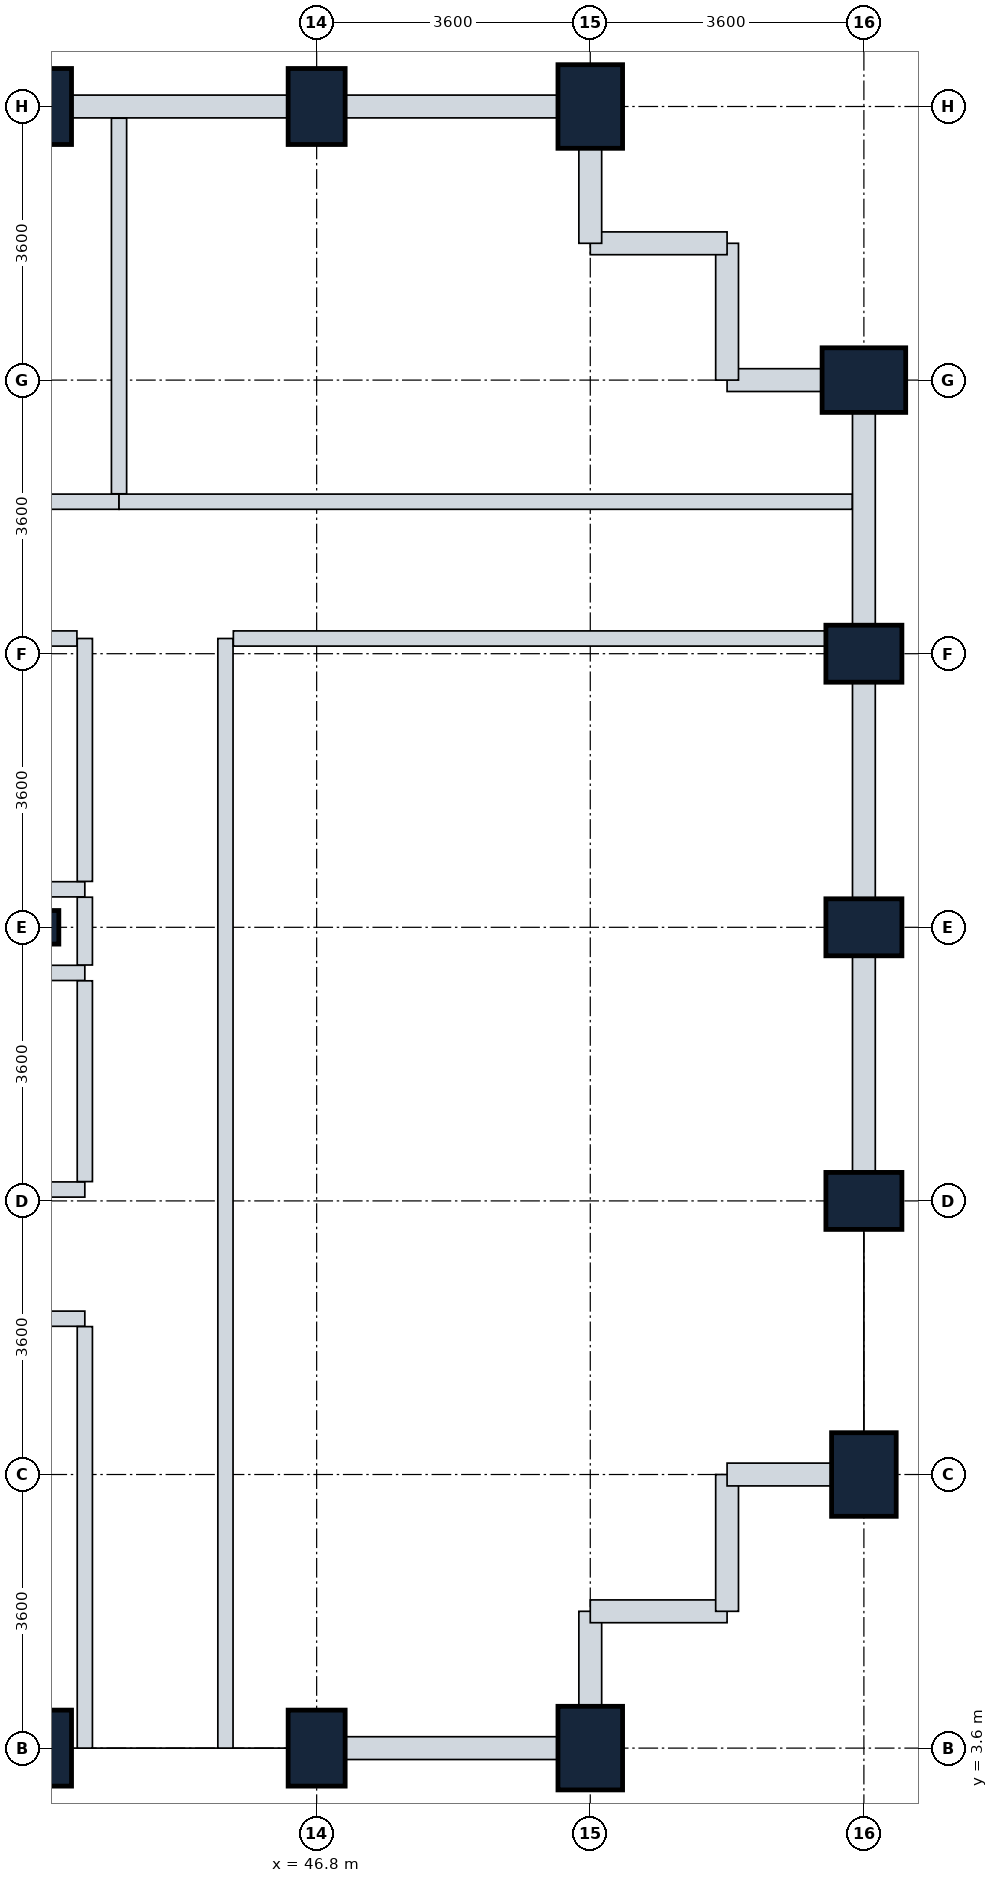
"""IFC4 building model, lengths in metres.
Left out: names, types, materials, properties, quantities, classifications, styles, units other than length and angle.
Written with IfcOpenShell. Run it as: python <this file> out.ifc"""

import sys

from ifc_helpers import new_model, si_unit, direction, frame, frame_2d, origin, origin_2d, place, context, subcontext, project, spatial, rectangle, i_section, extrude, element, fill, save


model = new_model("IFC4")
c1 = context("Model", 3, precision=1e-05, world=origin(), true_north=direction((0.0, 1.0)))
c2 = subcontext(c1, "Body", "Model", "MODEL_VIEW")
j1 = project(units=[si_unit("LENGTHUNIT", "METRE"), si_unit("PLANEANGLEUNIT", "RADIAN")], contexts=[c1])
p1 = place(None, origin())
s1 = spatial("IfcSite", under=j1, at=p1, CompositionType="ELEMENT")
p2 = place(p1, origin())
s2 = spatial("IfcBuilding", under=s1, at=p2, CompositionType="ELEMENT")
p3 = place(p2, frame((0.0, 0.0, 169.4)))
s3 = spatial("IfcBuildingStorey", under=s2, at=p3, CompositionType="ELEMENT", Elevation=169.4)
p4 = place(p3, frame((43.2, 3.6, 0.0), z_axis=(0.0, 0.0, 1.0), x_axis=(1.0, 0.0, 0.0)))
e1 = element("IfcColumn", 1, at=p4, inside=s3, PredefinedType="COLUMN", context=c2, shape_type="SweptSolid", body=[
    extrude(rectangle(XDim=0.75, YDim=1.0, at=origin_2d()), origin(), (0.0, 0.0, 1.0), 5.4),
])
p5 = place(p3, frame((43.2, 14.4, 0.0), z_axis=(0.0, 0.0, 1.0), x_axis=(1.0, 0.0, 0.0)))
e2 = element("IfcColumn", 2, at=p5, inside=s3, PredefinedType="COLUMN", context=c2, shape_type="SweptSolid", body=[
    extrude(i_section(OverallWidth=0.416, OverallDepth=0.442, WebThickness=0.025, FlangeThickness=0.041, FilletRadius=0.015, at=origin_2d()), origin(), (0.0, 0.0, 1.0), 5.4),
])
for number, where, z_axis, x_axis in (
    (3, (43.2, 25.2, 0.0), (0.0, 0.0, 1.0), (1.0, 0.0, 0.0)),
    (4, (46.8, 3.6, 0.0), (0.0, 0.0, 1.0), (1.0, 0.0, 0.0)),
    (5, (46.8, 25.2, 0.0), (0.0, 0.0, 1.0), (1.0, 0.0, 0.0)),
):
    element("IfcColumn", number, at=place(p3, frame(where, z_axis=z_axis, x_axis=x_axis)), inside=s3, PredefinedType="COLUMN", context=c2, shape_type="SweptSolid", body=[
        extrude(rectangle(XDim=0.75, YDim=1.0, at=origin_2d()), origin(), (0.0, 0.0, 1.0), 5.4),
    ])
for number, where, z_axis, x_axis in (
    (6, (50.4, 3.6, 0.0), (0.0, 0.0, 1.0), (1.0, 0.0, 0.0)),
    (7, (50.4, 25.2, 0.0), (0.0, 0.0, 1.0), (1.0, 0.0, 0.0)),
    (8, (54.0, 7.2, 0.0), (0.0, 0.0, 1.0), (1.0, 0.0, 0.0)),
):
    element("IfcColumn", number, at=place(p3, frame(where, z_axis=z_axis, x_axis=x_axis)), inside=s3, PredefinedType="COLUMN", context=c2, shape_type="SweptSolid", body=[
        extrude(rectangle(XDim=0.85, YDim=1.1, at=origin_2d()), origin(), (0.0, 0.0, 1.0), 5.4),
    ])
for number, where, z_axis, x_axis in (
    (9, (54.0, 10.8, 0.0), (0.0, 0.0, 1.0), (0.0, 1.0, 0.0)),
    (10, (54.0, 14.4, 0.0), (0.0, 0.0, 1.0), (0.0, 1.0, 0.0)),
    (11, (54.0, 18.0, 0.0), (0.0, 0.0, 1.0), (0.0, 1.0, 0.0)),
):
    element("IfcColumn", number, at=place(p3, frame(where, z_axis=z_axis, x_axis=x_axis)), inside=s3, PredefinedType="COLUMN", context=c2, shape_type="SweptSolid", body=[
        extrude(rectangle(XDim=0.75, YDim=1.0, at=origin_2d()), origin(), (0.0, 0.0, 1.0), 5.4),
    ])
p6 = place(p3, frame((54.0, 21.6, 0.0), z_axis=(0.0, 0.0, 1.0), x_axis=(0.0, 1.0, 0.0)))
e12 = element("IfcColumn", 12, at=p6, inside=s3, PredefinedType="COLUMN", context=c2, shape_type="SweptSolid", body=[
    extrude(rectangle(XDim=0.85, YDim=1.1, at=origin_2d()), origin(), (0.0, 0.0, 1.0), 5.4),
])
p7 = place(p3, frame((50.4, 3.6, 0.0), z_axis=(0.0, 0.0, 1.0), x_axis=(-1.0, 0.0, 0.0)))
e13 = element("IfcWall", 13, at=p7, inside=s3, PredefinedType="STANDARD", context=c2, shape_type="SweptSolid", body=[
    extrude(rectangle(XDim=3.6, YDim=0.3, at=frame_2d((1.8, 0.0))), origin(), (0.0, 0.0, 1.0), 3.58),
])
p8 = place(p3, frame((50.4, 5.4, 0.0), z_axis=(0.0, 0.0, 1.0), x_axis=(0.0, -1.0, 0.0)))
e14 = element("IfcWall", 14, at=p8, inside=s3, PredefinedType="STANDARD", context=c2, shape_type="SweptSolid", body=[
    extrude(rectangle(XDim=1.8, YDim=0.3, at=frame_2d((0.9, 0.0))), origin(), (0.0, 0.0, 1.0), 3.58),
])
p9 = place(p3, frame((52.2, 5.4, 0.0), z_axis=(0.0, 0.0, 1.0), x_axis=(-1.0, 0.0, 0.0)))
e15 = element("IfcWall", 15, at=p9, inside=s3, PredefinedType="STANDARD", context=c2, shape_type="SweptSolid", body=[
    extrude(rectangle(XDim=1.8, YDim=0.3, at=frame_2d((0.9, 0.0))), origin(), (0.0, 0.0, 1.0), 3.58),
])
p10 = place(p3, frame((52.2, 7.2, 0.0), z_axis=(0.0, 0.0, 1.0), x_axis=(0.0, -1.0, 0.0)))
e16 = element("IfcWall", 16, at=p10, inside=s3, PredefinedType="STANDARD", context=c2, shape_type="SweptSolid", body=[
    extrude(rectangle(XDim=1.8, YDim=0.3, at=frame_2d((0.9, 0.0))), origin(), (0.0, 0.0, 1.0), 5.065),
])
p11 = place(p3, frame((54.0, 7.2, 0.0), z_axis=(0.0, 0.0, 1.0), x_axis=(-1.0, 0.0, 0.0)))
e17 = element("IfcWall", 17, at=p11, inside=s3, PredefinedType="STANDARD", context=c2, shape_type="SweptSolid", body=[
    extrude(rectangle(XDim=1.8, YDim=0.3, at=frame_2d((0.9, 0.0))), origin(), (0.0, 0.0, 1.0), 4.03),
])
p12 = place(p3, frame((54.0, 14.4, 0.0), z_axis=(0.0, 0.0, 1.0), x_axis=(0.0, -1.0, 0.0)))
e18 = element("IfcWall", 18, at=p12, inside=s3, PredefinedType="STANDARD", context=c2, shape_type="SweptSolid", body=[
    extrude(rectangle(XDim=3.6, YDim=0.3, at=frame_2d((1.8, 0.0))), origin(), (0.0, 0.0, 1.0), 3.58),
])
p13 = place(p3, frame((54.0, 18.0, 0.0), z_axis=(0.0, 0.0, 1.0), x_axis=(0.0, -1.0, 0.0)))
e19 = element("IfcWall", 19, at=p13, inside=s3, PredefinedType="STANDARD", context=c2, shape_type="SweptSolid", body=[
    extrude(rectangle(XDim=3.6, YDim=0.3, at=frame_2d((1.8, 0.0))), origin(), (0.0, 0.0, 1.0), 3.58),
])
p14 = place(p3, frame((54.0, 21.6, 0.0), z_axis=(0.0, 0.0, 1.0), x_axis=(0.0, -1.0, 0.0)))
e20 = element("IfcWall", 20, at=p14, inside=s3, PredefinedType="STANDARD", context=c2, shape_type="SweptSolid", body=[
    extrude(rectangle(XDim=3.6, YDim=0.3, at=frame_2d((1.8, 0.0))), origin(), (0.0, 0.0, 1.0), 4.03),
])
p15 = place(p3, frame((52.2, 21.6, 0.0), z_axis=(0.0, 0.0, 1.0), x_axis=(1.0, 0.0, 0.0)))
e21 = element("IfcWall", 21, at=p15, inside=s3, PredefinedType="STANDARD", context=c2, shape_type="SweptSolid", body=[
    extrude(rectangle(XDim=1.8, YDim=0.3, at=frame_2d((0.9, 0.0))), origin(), (0.0, 0.0, 1.0), 4.03),
])
p16 = place(p3, frame((52.2, 23.4, 0.0), z_axis=(0.0, 0.0, 1.0), x_axis=(0.0, -1.0, 0.0)))
e22 = element("IfcWall", 22, at=p16, inside=s3, PredefinedType="STANDARD", context=c2, shape_type="SweptSolid", body=[
    extrude(rectangle(XDim=1.8, YDim=0.3, at=frame_2d((0.9, 0.0))), origin(), (0.0, 0.0, 1.0), 5.065),
])
for number, where, z_axis, x_axis in (
    (23, (50.4, 23.4, 0.0), (0.0, 0.0, 1.0), (1.0, 0.0, 0.0)),
    (24, (50.4, 25.2, 0.0), (0.0, 0.0, 1.0), (0.0, -1.0, 0.0)),
):
    element("IfcWall", number, at=place(p3, frame(where, z_axis=z_axis, x_axis=x_axis)), inside=s3, PredefinedType="STANDARD", context=c2, shape_type="SweptSolid", body=[
        extrude(rectangle(XDim=1.8, YDim=0.3, at=frame_2d((0.9, 0.0))), origin(), (0.0, 0.0, 1.0), 3.58),
    ])
p17 = place(p3, frame((46.8, 25.2, 0.0), z_axis=(0.0, 0.0, 1.0), x_axis=(1.0, 0.0, 0.0)))
e25 = element("IfcWall", 25, at=p17, inside=s3, PredefinedType="STANDARD", context=c2, shape_type="SweptSolid", body=[
    extrude(rectangle(XDim=3.6, YDim=0.3, at=frame_2d((1.8, 0.0))), origin(), (0.0, 0.0, 1.0), 3.58),
])
p18 = place(p3, frame((43.2, 25.2, 0.0), z_axis=(0.0, 0.0, 1.0), x_axis=(1.0, 0.0, 0.0)))
e26 = element("IfcWall", 26, at=p18, inside=s3, PredefinedType="STANDARD", context=c2, shape_type="SweptSolid", body=[
    extrude(rectangle(XDim=3.6, YDim=0.3, at=frame_2d((1.8, 0.0))), origin(), (0.0, 0.0, 1.0), 4.53),
])
for number, where, z_axis, x_axis in (
    (27, (32.654, 13.8, 0.0), (0.0, 0.0, 1.0), (1.0, 0.0, 0.0)),
    (28, (32.654, 14.9, 0.0), (0.0, 0.0, 1.0), (1.0, 0.0, 0.0)),
):
    element("IfcWall", number, at=place(p3, frame(where, z_axis=z_axis, x_axis=x_axis)), inside=s3, PredefinedType="PARTITIONING", context=c2, shape_type="SweptSolid", body=[
        extrude(rectangle(XDim=11.096, YDim=0.2, at=frame_2d((5.548, 0.0))), origin(), (0.0, 0.0, 1.0), 3.58),
    ])
p19 = place(p3, frame((43.75, 13.904, 0.0), z_axis=(0.0, 0.0, 1.0), x_axis=(0.0, 1.0, 0.0)))
e29 = element("IfcWall", 29, at=p19, inside=s3, PredefinedType="PARTITIONING", context=c2, shape_type="SweptSolid", body=[
    extrude(rectangle(XDim=0.892, YDim=0.2, at=frame_2d((0.446, 0.0))), origin(), (0.0, 0.0, 1.0), 3.58),
])
p20 = place(p3, frame((34.4, 9.25, 0.0), z_axis=(0.0, 0.0, 1.0), x_axis=(1.0, 0.0, 0.0)))
e30 = element("IfcWall", 30, at=p20, inside=s3, PredefinedType="PARTITIONING", context=c2, shape_type="SweptSolid", body=[
    extrude(rectangle(XDim=9.35, YDim=0.2, at=frame_2d((4.675, 0.0))), origin(), (0.0, 0.0, 1.0), 4.7),
])
p21 = place(p20, frame((3.735, 0.0, 0.0)))
e31 = element("IfcOpeningElement", 31, at=p21, cuts=e30, PredefinedType="OPENING", context=c2, shape_type="SweptSolid", body=[
    extrude(rectangle(XDim=1.8, YDim=2.2, at=frame_2d((0.9, 1.1))), frame((0.0, 0.11, 0.0), z_axis=(0.0, -1.0, 0.0), x_axis=(1.0, 0.0, 0.0)), (0.0, 0.0, 1.0), 0.22),
])
p22 = place(p3, frame((43.75, 3.6, 0.0), z_axis=(0.0, 0.0, 1.0), x_axis=(0.0, 1.0, 0.0)))
e32 = element("IfcWall", 32, at=p22, inside=s3, PredefinedType="PARTITIONING", context=c2, shape_type="SweptSolid", body=[
    extrude(rectangle(XDim=5.546, YDim=0.2, at=frame_2d((2.773, 0.0))), origin(), (0.0, 0.0, 1.0), 4.53),
])
p23 = place(p3, frame((45.6, 3.6, 0.0), z_axis=(0.0, 0.0, 1.0), x_axis=(0.0, 1.0, 0.0)))
e33 = element("IfcWall", 33, at=p23, inside=s3, PredefinedType="PARTITIONING", context=c2, shape_type="SweptSolid", body=[
    extrude(rectangle(XDim=14.6, YDim=0.2, at=frame_2d((7.3, 0.0))), origin(), (0.0, 0.0, 1.0), 3.58),
])
p24 = place(p23, frame((6.36, 0.0, 0.0)))
e34 = element("IfcOpeningElement", 34, at=p24, cuts=e33, PredefinedType="OPENING", context=c2, shape_type="SweptSolid", body=[
    extrude(rectangle(XDim=1.8, YDim=2.2, at=frame_2d((0.9, 1.1))), frame((0.0, 0.11, 0.0), z_axis=(0.0, -1.0, 0.0), x_axis=(1.0, 0.0, 0.0)), (0.0, 0.0, 1.0), 0.22),
])
p25 = place(p3, frame((45.704, 18.2, 0.0), z_axis=(0.0, 0.0, 1.0), x_axis=(1.0, 0.0, 0.0)))
e35 = element("IfcWall", 35, at=p25, inside=s3, PredefinedType="PARTITIONING", context=c2, shape_type="SweptSolid", body=[
    extrude(rectangle(XDim=8.142, YDim=0.2, at=frame_2d((4.071, 0.0))), origin(), (0.0, 0.0, 1.0), 3.58),
])
p26 = place(p3, frame((43.75, 15.004, 0.0), z_axis=(0.0, 0.0, 1.0), x_axis=(0.0, 1.0, 0.0)))
e36 = element("IfcWall", 36, at=p26, inside=s3, PredefinedType="PARTITIONING", context=c2, shape_type="SweptSolid", body=[
    extrude(rectangle(XDim=3.196, YDim=0.2, at=frame_2d((1.598, 0.0))), origin(), (0.0, 0.0, 1.0), 3.58),
])
p27 = place(p3, frame((34.504, 18.2, 0.0), z_axis=(0.0, 0.0, 1.0), x_axis=(1.0, 0.0, 0.0)))
e37 = element("IfcWall", 37, at=p27, inside=s3, PredefinedType="PARTITIONING", context=c2, shape_type="SweptSolid", body=[
    extrude(rectangle(XDim=9.142, YDim=0.2, at=frame_2d((4.571, 0.0))), origin(), (0.0, 0.0, 1.0), 4.7),
])
p28 = place(p27, frame((4.031, 0.0, 0.0)))
e38 = element("IfcOpeningElement", 38, at=p28, cuts=e37, PredefinedType="OPENING", context=c2, shape_type="SweptSolid", body=[
    extrude(rectangle(XDim=1.0, YDim=2.1, at=frame_2d((0.5, 1.05))), frame((0.0, 0.11, 0.0), z_axis=(0.0, -1.0, 0.0), x_axis=(1.0, 0.0, 0.0)), (0.0, 0.0, 1.0), 0.22),
])
p29 = place(p3, frame((34.4, 20.0, 0.0), z_axis=(0.0, 0.0, 1.0), x_axis=(1.0, 0.0, 0.0)))
e39 = element("IfcWall", 39, at=p29, inside=s3, PredefinedType="PARTITIONING", context=c2, shape_type="SweptSolid", body=[
    extrude(rectangle(XDim=9.8, YDim=0.2, at=frame_2d((4.9, 0.0))), origin(), (0.0, 0.0, 1.0), 4.7),
])
p30 = place(p29, frame((3.96, 0.0, 0.0)))
e40 = element("IfcOpeningElement", 40, at=p30, cuts=e39, PredefinedType="OPENING", context=c2, shape_type="SweptSolid", body=[
    extrude(rectangle(XDim=1.8, YDim=2.2, at=frame_2d((0.9, 1.1))), frame((0.0, 0.11, 0.0), z_axis=(0.0, -1.0, 0.0), x_axis=(1.0, 0.0, 0.0)), (0.0, 0.0, 1.0), 0.22),
])
p31 = place(p3, frame((44.2, 20.0, 0.0), z_axis=(0.0, 0.0, 1.0), x_axis=(1.0, 0.0, 0.0)))
e41 = element("IfcWall", 41, at=p31, inside=s3, PredefinedType="PARTITIONING", context=c2, shape_type="SweptSolid", body=[
    extrude(rectangle(XDim=9.646, YDim=0.2, at=frame_2d((4.823, 0.0))), origin(), (0.0, 0.0, 1.0), 3.58),
])
p32 = place(p31, frame((4.44, 0.0, 0.0)))
e42 = element("IfcOpeningElement", 42, at=p32, cuts=e41, PredefinedType="OPENING", context=c2, shape_type="SweptSolid", body=[
    extrude(rectangle(XDim=1.0, YDim=2.1, at=frame_2d((0.5, 1.05))), frame((0.0, 0.11, 0.0), z_axis=(0.0, -1.0, 0.0), x_axis=(1.0, 0.0, 0.0)), (0.0, 0.0, 1.0), 0.22),
])
p33 = place(p3, frame((44.2, 20.104, 0.0), z_axis=(0.0, 0.0, 1.0), x_axis=(0.0, 1.0, 0.0)))
e43 = element("IfcWall", 43, at=p33, inside=s3, PredefinedType="PARTITIONING", context=c2, shape_type="SweptSolid", body=[
    extrude(rectangle(XDim=4.942, YDim=0.2, at=frame_2d((2.471, 0.0))), origin(), (0.0, 0.0, 1.0), 4.53),
])
p34 = place(p3, frame((32.654, 10.95, 0.0), z_axis=(0.0, 0.0, 1.0), x_axis=(1.0, 0.0, 0.0)))
e44 = element("IfcWall", 44, at=p34, inside=s3, PredefinedType="PARTITIONING", context=c2, shape_type="SweptSolid", body=[
    extrude(rectangle(XDim=11.096, YDim=0.2, at=frame_2d((5.548, 0.0))), origin(), (0.0, 0.0, 1.0), 4.7),
])
p35 = place(p34, frame((4.921, 0.0, 0.0)))
e45 = element("IfcOpeningElement", 45, at=p35, cuts=e44, PredefinedType="OPENING", context=c2, shape_type="SweptSolid", body=[
    extrude(rectangle(XDim=1.0, YDim=2.1, at=frame_2d((0.5, 1.05))), frame((0.0, 0.11, 0.0), z_axis=(0.0, -1.0, 0.0), x_axis=(1.0, 0.0, 0.0)), (0.0, 0.0, 1.0), 0.22),
])
p36 = place(p3, frame((43.75, 11.054, 0.0), z_axis=(0.0, 0.0, 1.0), x_axis=(0.0, 1.0, 0.0)))
e46 = element("IfcWall", 46, at=p36, inside=s3, PredefinedType="PARTITIONING", context=c2, shape_type="SweptSolid", body=[
    extrude(rectangle(XDim=2.642, YDim=0.2, at=frame_2d((1.321, 0.0))), origin(), (0.0, 0.0, 1.0), 5.065),
])
p37 = place(p24, origin())
e47 = element("IfcDoor", 47, at=p37, inside=s3, OperationType="DOUBLE_DOOR_SINGLE_SWING", PredefinedType="DOOR", context=c2, shape_type="SweptSolid", body=[
    extrude(rectangle(XDim=1.8, YDim=2.2, at=frame_2d((0.9, 1.1))), frame((0.0, 0.025, 0.0), z_axis=(0.0, -1.0, 0.0), x_axis=(1.0, 0.0, 0.0)), (0.0, 0.0, 1.0), 0.05),
])
fill(e34, e47)
p38 = place(p32, origin())
e48 = element("IfcDoor", 48, at=p38, inside=s3, OperationType="SINGLE_SWING_RIGHT", PredefinedType="DOOR", context=c2, shape_type="SweptSolid", body=[
    extrude(rectangle(XDim=1.0, YDim=2.1, at=frame_2d((0.5, 1.05))), frame((0.0, 0.025, 0.0), z_axis=(0.0, -1.0, 0.0), x_axis=(1.0, 0.0, 0.0)), (0.0, 0.0, 1.0), 0.05),
])
fill(e42, e48)
save(model, sys.argv[1])
